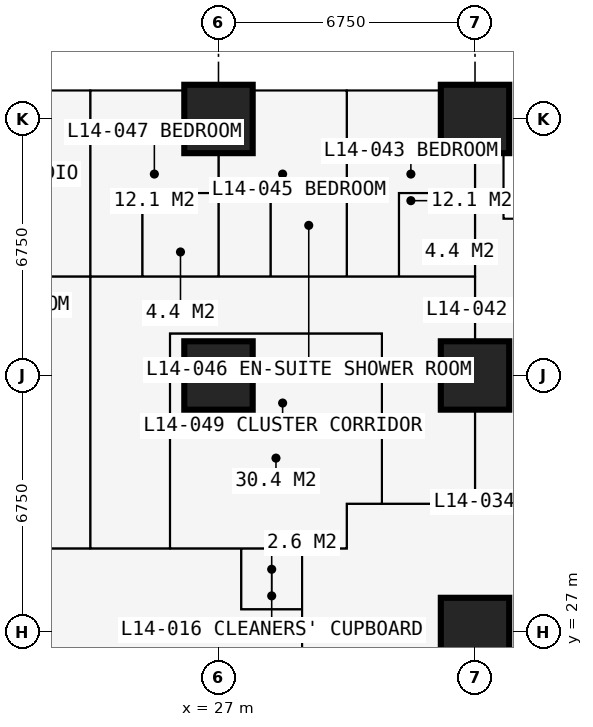
"""IFC4 building model, lengths in metres.
Left out: names, types, materials, properties, quantities, classifications, styles, units other than length and angle.
Written with IfcOpenShell. Run it as: python <this file> out.ifc"""

import sys

from ifc_helpers import new_model, si_unit, direction, frame, frame_2d, origin, origin_2d, place, context, subcontext, project, spatial, rectangle, extrude, element, fill, save


model = new_model("IFC4")
c1 = context("Model", 3, precision=1e-05, world=origin(), true_north=direction((0.0, 1.0)))
c2 = subcontext(c1, "Body", "Model", "MODEL_VIEW")
j1 = project(units=[si_unit("LENGTHUNIT", "METRE"), si_unit("PLANEANGLEUNIT", "RADIAN")], contexts=[c1])
p1 = place(None, origin())
s1 = spatial("IfcSite", under=j1, at=p1, CompositionType="ELEMENT")
p2 = place(p1, origin())
s2 = spatial("IfcBuilding", under=s1, at=p2, CompositionType="ELEMENT")
p3 = place(p2, frame((0.0, 0.0, 54.0)))
s3 = spatial("IfcBuildingStorey", under=s2, at=p3, CompositionType="ELEMENT", Elevation=54.0)
for number, where, z_axis, x_axis in (
    (1, (27.0, 33.75, 0.0), (0.0, 0.0, 1.0), (1.0, 0.0, 0.0)),
    (2, (27.0, 40.5, 0.0), (0.0, 0.0, 1.0), (1.0, 0.0, 0.0)),
    (3, (33.75, 27.0, 0.0), (0.0, 0.0, 1.0), (1.0, 0.0, 0.0)),
    (4, (33.75, 33.75, 0.0), (0.0, 0.0, 1.0), (1.0, 0.0, 0.0)),
    (5, (33.75, 40.5, 0.0), (0.0, 0.0, 1.0), (1.0, 0.0, 0.0)),
):
    element("IfcColumn", number, at=place(p3, frame(where, z_axis=z_axis, x_axis=x_axis)), inside=s3, PredefinedType="COLUMN", context=c2, shape_type="SweptSolid", body=[
        extrude(rectangle(XDim=1.8, YDim=1.8, at=origin_2d()), origin(), (0.0, 0.0, 1.0), 3.6),
    ])
p4 = place(p3, frame((27.6, 27.0, 0.0), z_axis=(0.0, 0.0, 1.0), x_axis=(-1.0, 0.0, 0.0)))
e6 = element("IfcWall", 6, at=p4, inside=s3, PredefinedType="SHEAR", context=c2, shape_type="SweptSolid", body=[
    extrude(rectangle(XDim=14.7, YDim=1.2, at=frame_2d((7.35, 0.0))), origin(), (0.0, 0.0, 1.0), 3.6),
])
p5 = place(p4, frame((4.55, 0.0, 0.0)))
e7 = element("IfcOpeningElement", 7, at=p5, cuts=e6, PredefinedType="OPENING", context=c2, shape_type="SweptSolid", body=[
    extrude(rectangle(XDim=0.9, YDim=2.2, at=frame_2d((0.45, 1.1))), frame((0.0, 0.61, 0.0), z_axis=(0.0, -1.0, 0.0), x_axis=(1.0, 0.0, 0.0)), (0.0, 0.0, 1.0), 1.22),
])
p6 = place(p4, frame((7.525, 0.0, 0.0)))
e8 = element("IfcOpeningElement", 8, at=p6, cuts=e6, PredefinedType="OPENING", context=c2, shape_type="SweptSolid", body=[
    extrude(rectangle(XDim=1.0, YDim=2.2, at=frame_2d((0.5, 1.1))), frame((0.0, 0.61, 0.0), z_axis=(0.0, -1.0, 0.0), x_axis=(1.0, 0.0, 0.0)), (0.0, 0.0, 1.0), 1.22),
])
p7 = place(p3, frame((37.875, 37.875, 0.0), z_axis=(0.0, 0.0, 1.0), x_axis=(-1.0, 0.0, 0.0)))
e9 = element("IfcWall", 9, at=p7, inside=s3, PredefinedType="SOLIDWALL", context=c2, shape_type="SweptSolid", body=[
    extrude(rectangle(XDim=3.375, YDim=0.3, at=frame_2d((1.688, 0.0))), origin(), (0.0, 0.0, 1.0), 3.375),
])
p8 = place(p7, frame((0.788, 0.0, 0.6)))
e10 = element("IfcOpeningElement", 10, at=p8, cuts=e9, PredefinedType="OPENING", context=c2, shape_type="SweptSolid", body=[
    extrude(rectangle(XDim=1.8, YDim=2.1, at=frame_2d((0.9, 1.05))), frame((0.0, 0.16, 0.0), z_axis=(0.0, -1.0, 0.0), x_axis=(1.0, 0.0, 0.0)), (0.0, 0.0, 1.0), 0.32),
])
p9 = place(p3, frame((34.5, 37.875, 0.0), z_axis=(0.0, 0.0, 1.0), x_axis=(0.0, 1.0, 0.0)))
e11 = element("IfcWall", 11, at=p9, inside=s3, PredefinedType="SOLIDWALL", context=c2, shape_type="SweptSolid", body=[
    extrude(rectangle(XDim=3.375, YDim=0.3, at=frame_2d((1.688, 0.0))), origin(), (0.0, 0.0, 1.0), 3.375),
])
p10 = place(p9, frame((0.343, 0.0, 0.9)))
e12 = element("IfcOpeningElement", 12, at=p10, cuts=e11, PredefinedType="OPENING", context=c2, shape_type="SweptSolid", body=[
    extrude(rectangle(XDim=1.2, YDim=1.8, at=frame_2d((0.6, 0.9))), frame((0.0, 0.16, 0.0), z_axis=(0.0, -1.0, 0.0), x_axis=(1.0, 0.0, 0.0)), (0.0, 0.0, 1.0), 0.32),
])
p11 = place(p3, frame((10.125, 36.35, 0.0), z_axis=(0.0, 0.0, 1.0), x_axis=(1.0, 0.0, 0.0)))
e13 = element("IfcWall", 13, at=p11, inside=s3, PredefinedType="PARTITIONING", context=c2, shape_type="SweptSolid", body=[
    extrude(rectangle(XDim=23.625, YDim=0.15, at=frame_2d((11.812, 0.0))), origin(), (0.0, 0.0, 1.0), 3.375),
])
p12 = place(p11, frame((20.5, 0.0, 0.0)))
e14 = element("IfcOpeningElement", 14, at=p12, cuts=e13, PredefinedType="OPENING", context=c2, shape_type="SweptSolid", body=[
    extrude(rectangle(XDim=0.95, YDim=2.2, at=frame_2d((0.475, 1.1))), frame((0.0, 0.085, 0.0), z_axis=(0.0, -1.0, 0.0), x_axis=(1.0, 0.0, 0.0)), (0.0, 0.0, 1.0), 0.17),
])
p13 = place(p11, frame((17.125, 0.0, 0.0)))
e15 = element("IfcOpeningElement", 15, at=p13, cuts=e13, PredefinedType="OPENING", context=c2, shape_type="SweptSolid", body=[
    extrude(rectangle(XDim=0.95, YDim=2.2, at=frame_2d((0.475, 1.1))), frame((0.0, 0.085, 0.0), z_axis=(0.0, -1.0, 0.0), x_axis=(1.0, 0.0, 0.0)), (0.0, 0.0, 1.0), 0.17),
])
p14 = place(p11, frame((13.7, 0.0, 0.0)))
e16 = element("IfcOpeningElement", 16, at=p14, cuts=e13, PredefinedType="OPENING", context=c2, shape_type="SweptSolid", body=[
    extrude(rectangle(XDim=0.95, YDim=2.2, at=frame_2d((0.475, 1.1))), frame((0.0, 0.085, 0.0), z_axis=(0.0, -1.0, 0.0), x_axis=(1.0, 0.0, 0.0)), (0.0, 0.0, 1.0), 0.17),
])
p15 = place(p11, frame((4.2, 0.0, 0.0)))
e17 = element("IfcOpeningElement", 17, at=p15, cuts=e13, PredefinedType="OPENING", context=c2, shape_type="SweptSolid", body=[
    extrude(rectangle(XDim=0.95, YDim=2.2, at=frame_2d((0.475, 1.1))), frame((0.0, 0.085, 0.0), z_axis=(0.0, -1.0, 0.0), x_axis=(1.0, 0.0, 0.0)), (0.0, 0.0, 1.0), 0.17),
])
p16 = place(p11, frame((10.95, 0.0, 0.0)))
e18 = element("IfcOpeningElement", 18, at=p16, cuts=e13, PredefinedType="OPENING", context=c2, shape_type="SweptSolid", body=[
    extrude(rectangle(XDim=0.95, YDim=2.2, at=frame_2d((0.475, 1.1))), frame((0.0, 0.085, 0.0), z_axis=(0.0, -1.0, 0.0), x_axis=(1.0, 0.0, 0.0)), (0.0, 0.0, 1.0), 0.17),
])
p17 = place(p3, frame((11.3, 29.2, 0.0), z_axis=(0.0, 0.0, 1.0), x_axis=(1.0, 0.0, 0.0)))
e19 = element("IfcWall", 19, at=p17, inside=s3, PredefinedType="PARTITIONING", context=c2, shape_type="SweptSolid", body=[
    extrude(rectangle(XDim=19.075, YDim=0.15, at=frame_2d((9.538, 0.0))), origin(), (0.0, 0.0, 1.0), 3.375),
])
p18 = place(p17, frame((12.875, 0.0, 0.0)))
e20 = element("IfcOpeningElement", 20, at=p18, cuts=e19, PredefinedType="OPENING", context=c2, shape_type="SweptSolid", body=[
    extrude(rectangle(XDim=1.0, YDim=2.2, at=frame_2d((0.5, 1.1))), frame((0.0, 0.085, 0.0), z_axis=(0.0, -1.0, 0.0), x_axis=(1.0, 0.0, 0.0)), (0.0, 0.0, 1.0), 0.17),
])
p19 = place(p17, frame((10.438, 0.0, 0.0)))
e21 = element("IfcOpeningElement", 21, at=p19, cuts=e19, PredefinedType="OPENING", context=c2, shape_type="SweptSolid", body=[
    extrude(rectangle(XDim=1.0, YDim=2.2, at=frame_2d((0.5, 1.1))), frame((0.0, 0.085, 0.0), z_axis=(0.0, -1.0, 0.0), x_axis=(1.0, 0.0, 0.0)), (0.0, 0.0, 1.0), 0.17),
])
p20 = place(p17, frame((14.875, 0.0, 0.0)))
e22 = element("IfcOpeningElement", 22, at=p20, cuts=e19, PredefinedType="OPENING", context=c2, shape_type="SweptSolid", body=[
    extrude(rectangle(XDim=0.95, YDim=2.2, at=frame_2d((0.475, 1.1))), frame((0.0, 0.085, 0.0), z_axis=(0.0, -1.0, 0.0), x_axis=(1.0, 0.0, 0.0)), (0.0, 0.0, 1.0), 0.17),
])
p21 = place(p3, frame((23.625, 29.2, 0.0), z_axis=(0.0, 0.0, 1.0), x_axis=(0.0, 1.0, 0.0)))
e23 = element("IfcWall", 23, at=p21, inside=s3, PredefinedType="PARTITIONING", context=c2, shape_type="SweptSolid", body=[
    extrude(rectangle(XDim=12.034, YDim=0.15, at=frame_2d((6.017, 0.0))), origin(), (0.0, 0.0, 1.0), 3.375),
])
p22 = place(p3, frame((25.0, 36.35, 0.0), z_axis=(0.0, 0.0, 1.0), x_axis=(0.0, 1.0, 0.0)))
e24 = element("IfcWall", 24, at=p22, inside=s3, PredefinedType="PARTITIONING", context=c2, shape_type="SweptSolid", body=[
    extrude(rectangle(XDim=2.2, YDim=0.1, at=frame_2d((1.1, 0.0))), origin(), (0.0, 0.0, 1.0), 3.375),
])
p23 = place(p3, frame((25.0, 38.55, 0.0), z_axis=(0.0, 0.0, 1.0), x_axis=(1.0, 0.0, 0.0)))
e25 = element("IfcWall", 25, at=p23, inside=s3, PredefinedType="PARTITIONING", context=c2, shape_type="SweptSolid", body=[
    extrude(rectangle(XDim=2.0, YDim=0.1, at=frame_2d((1.0, 0.0))), origin(), (0.0, 0.0, 1.0), 3.375),
])
p24 = place(p3, frame((25.725, 29.2, 0.0), z_axis=(0.0, 0.0, 1.0), x_axis=(0.0, 1.0, 0.0)))
e26 = element("IfcWall", 26, at=p24, inside=s3, PredefinedType="PARTITIONING", context=c2, shape_type="SweptSolid", body=[
    extrude(rectangle(XDim=5.65, YDim=0.15, at=frame_2d((2.825, 0.0))), origin(), (0.0, 0.0, 1.0), 3.375),
])
p25 = place(p3, frame((25.725, 34.85, 0.0), z_axis=(0.0, 0.0, 1.0), x_axis=(1.0, 0.0, 0.0)))
e27 = element("IfcWall", 27, at=p25, inside=s3, PredefinedType="PARTITIONING", context=c2, shape_type="SweptSolid", body=[
    extrude(rectangle(XDim=5.575, YDim=0.15, at=frame_2d((2.788, 0.0))), origin(), (0.0, 0.0, 1.0), 3.375),
])
p26 = place(p3, frame((27.0, 36.35, 0.0), z_axis=(0.0, 0.0, 1.0), x_axis=(0.0, 1.0, 0.0)))
e28 = element("IfcWall", 28, at=p26, inside=s3, PredefinedType="PARTITIONING", context=c2, shape_type="SweptSolid", body=[
    extrude(rectangle(XDim=4.884, YDim=0.175, at=frame_2d((2.442, 0.0))), origin(), (0.0, 0.0, 1.0), 2.61),
])
p27 = place(p26, frame((0.65, 0.0, 0.0)))
e29 = element("IfcOpeningElement", 29, at=p27, cuts=e28, PredefinedType="OPENING", context=c2, shape_type="SweptSolid", body=[
    extrude(rectangle(XDim=0.9, YDim=2.2, at=frame_2d((0.45, 1.1))), frame((0.0, 0.097, 0.0), z_axis=(0.0, -1.0, 0.0), x_axis=(1.0, 0.0, 0.0)), (0.0, 0.0, 1.0), 0.195),
])
p28 = place(p3, frame((27.6, 27.6, 0.0), z_axis=(0.0, 0.0, 1.0), x_axis=(0.0, 1.0, 0.0)))
e30 = element("IfcWall", 30, at=p28, inside=s3, PredefinedType="PARTITIONING", context=c2, shape_type="SweptSolid", body=[
    extrude(rectangle(XDim=1.6, YDim=0.15, at=frame_2d((0.8, 0.0))), origin(), (0.0, 0.0, 1.0), 3.375),
])
p29 = place(p28, frame((0.3, 0.0, 0.0)))
e31 = element("IfcOpeningElement", 31, at=p29, cuts=e30, PredefinedType="OPENING", context=c2, shape_type="SweptSolid", body=[
    extrude(rectangle(XDim=0.95, YDim=2.2, at=frame_2d((0.475, 1.1))), frame((0.0, 0.085, 0.0), z_axis=(0.0, -1.0, 0.0), x_axis=(1.0, 0.0, 0.0)), (0.0, 0.0, 1.0), 0.17),
])
p30 = place(p3, frame((27.6, 27.6, 0.0), z_axis=(0.0, 0.0, 1.0), x_axis=(1.0, 0.0, 0.0)))
e32 = element("IfcWall", 32, at=p30, inside=s3, PredefinedType="PARTITIONING", context=c2, shape_type="SweptSolid", body=[
    extrude(rectangle(XDim=1.6, YDim=0.15, at=frame_2d((0.8, 0.0))), origin(), (0.0, 0.0, 1.0), 2.877),
])
p31 = place(p3, frame((28.375, 36.35, 0.0), z_axis=(0.0, 0.0, 1.0), x_axis=(0.0, 1.0, 0.0)))
e33 = element("IfcWall", 33, at=p31, inside=s3, PredefinedType="PARTITIONING", context=c2, shape_type="SweptSolid", body=[
    extrude(rectangle(XDim=2.2, YDim=0.1, at=frame_2d((1.1, 0.0))), origin(), (0.0, 0.0, 1.0), 3.375),
])
p32 = place(p3, frame((28.375, 38.55, 0.0), z_axis=(0.0, 0.0, 1.0), x_axis=(1.0, 0.0, 0.0)))
e34 = element("IfcWall", 34, at=p32, inside=s3, PredefinedType="PARTITIONING", context=c2, shape_type="SweptSolid", body=[
    extrude(rectangle(XDim=2.0, YDim=0.1, at=frame_2d((1.0, 0.0))), origin(), (0.0, 0.0, 1.0), 3.375),
])
p33 = place(p3, frame((29.2, 11.3, 0.0), z_axis=(0.0, 0.0, 1.0), x_axis=(0.0, 1.0, 0.0)))
e35 = element("IfcWall", 35, at=p33, inside=s3, PredefinedType="PARTITIONING", context=c2, shape_type="SweptSolid", body=[
    extrude(rectangle(XDim=17.9, YDim=0.2, at=frame_2d((8.95, 0.0))), origin(), (0.0, 0.0, 1.0), 3.375),
])
p34 = place(p33, frame((8.35, 0.0, 0.0)))
e36 = element("IfcOpeningElement", 36, at=p34, cuts=e35, PredefinedType="OPENING", context=c2, shape_type="SweptSolid", body=[
    extrude(rectangle(XDim=1.2, YDim=2.2, at=frame_2d((0.6, 1.1))), frame((0.0, 0.11, 0.0), z_axis=(0.0, -1.0, 0.0), x_axis=(1.0, 0.0, 0.0)), (0.0, 0.0, 1.0), 0.22),
])
p35 = place(p3, frame((30.375, 29.2, 0.0), z_axis=(0.0, 0.0, 1.0), x_axis=(0.0, 1.0, 0.0)))
e37 = element("IfcWall", 37, at=p35, inside=s3, PredefinedType="PARTITIONING", context=c2, shape_type="SweptSolid", body=[
    extrude(rectangle(XDim=1.175, YDim=0.15, at=frame_2d((0.587, 0.0))), origin(), (0.0, 0.0, 1.0), 3.375),
])
p36 = place(p3, frame((30.375, 30.375, 0.0), z_axis=(0.0, 0.0, 1.0), x_axis=(1.0, 0.0, 0.0)))
e38 = element("IfcWall", 38, at=p36, inside=s3, PredefinedType="PARTITIONING", context=c2, shape_type="SweptSolid", body=[
    extrude(rectangle(XDim=10.859, YDim=0.15, at=frame_2d((5.429, 0.0))), origin(), (0.0, 0.0, 1.0), 3.375),
])
p37 = place(p3, frame((30.375, 36.35, 0.0), z_axis=(0.0, 0.0, 1.0), x_axis=(0.0, 1.0, 0.0)))
e39 = element("IfcWall", 39, at=p37, inside=s3, PredefinedType="PARTITIONING", context=c2, shape_type="SweptSolid", body=[
    extrude(rectangle(XDim=4.884, YDim=0.175, at=frame_2d((2.442, 0.0))), origin(), (0.0, 0.0, 1.0), 3.375),
])
p38 = place(p37, frame((0.65, 0.0, 0.0)))
e40 = element("IfcOpeningElement", 40, at=p38, cuts=e39, PredefinedType="OPENING", context=c2, shape_type="SweptSolid", body=[
    extrude(rectangle(XDim=0.9, YDim=2.2, at=frame_2d((0.45, 1.1))), frame((0.0, 0.097, 0.0), z_axis=(0.0, -1.0, 0.0), x_axis=(1.0, 0.0, 0.0)), (0.0, 0.0, 1.0), 0.195),
])
p39 = place(p3, frame((31.3, 30.375, 0.0), z_axis=(0.0, 0.0, 1.0), x_axis=(0.0, 1.0, 0.0)))
e41 = element("IfcWall", 41, at=p39, inside=s3, PredefinedType="PARTITIONING", context=c2, shape_type="SweptSolid", body=[
    extrude(rectangle(XDim=4.475, YDim=0.15, at=frame_2d((2.238, 0.0))), origin(), (0.0, 0.0, 1.0), 3.375),
])
p40 = place(p3, frame((31.75, 36.35, 0.0), z_axis=(0.0, 0.0, 1.0), x_axis=(0.0, 1.0, 0.0)))
e42 = element("IfcWall", 42, at=p40, inside=s3, PredefinedType="PARTITIONING", context=c2, shape_type="SweptSolid", body=[
    extrude(rectangle(XDim=2.2, YDim=0.1, at=frame_2d((1.1, 0.0))), origin(), (0.0, 0.0, 1.0), 3.375),
])
p41 = place(p40, frame((0.65, 0.0, 0.0)))
e43 = element("IfcOpeningElement", 43, at=p41, cuts=e42, PredefinedType="OPENING", context=c2, shape_type="SweptSolid", body=[
    extrude(rectangle(XDim=0.9, YDim=2.2, at=frame_2d((0.45, 1.1))), frame((0.0, 0.06, 0.0), z_axis=(0.0, -1.0, 0.0), x_axis=(1.0, 0.0, 0.0)), (0.0, 0.0, 1.0), 0.12),
])
p42 = place(p3, frame((31.75, 38.55, 0.0), z_axis=(0.0, 0.0, 1.0), x_axis=(1.0, 0.0, 0.0)))
e44 = element("IfcWall", 44, at=p42, inside=s3, PredefinedType="PARTITIONING", context=c2, shape_type="SweptSolid", body=[
    extrude(rectangle(XDim=2.0, YDim=0.1, at=frame_2d((1.0, 0.0))), origin(), (0.0, 0.0, 1.0), 3.375),
])
p43 = place(p3, frame((33.75, 30.375, 0.0), z_axis=(0.0, 0.0, 1.0), x_axis=(0.0, 1.0, 0.0)))
e45 = element("IfcWall", 45, at=p43, inside=s3, PredefinedType="PARTITIONING", context=c2, shape_type="SweptSolid", body=[
    extrude(rectangle(XDim=10.859, YDim=0.15, at=frame_2d((5.429, 0.0))), origin(), (0.0, 0.0, 1.0), 2.877),
])
p44 = place(p43, frame((1.45, 0.0, 0.0)))
e46 = element("IfcOpeningElement", 46, at=p44, cuts=e45, PredefinedType="OPENING", context=c2, shape_type="SweptSolid", body=[
    extrude(rectangle(XDim=1.0, YDim=2.2, at=frame_2d((0.5, 1.1))), frame((0.0, 0.085, 0.0), z_axis=(0.0, -1.0, 0.0), x_axis=(1.0, 0.0, 0.0)), (0.0, 0.0, 1.0), 0.17),
])
p45 = place(p10, origin())
e47 = element("IfcWindow", 47, at=p45, inside=s3, PartitioningType="SINGLE_PANEL", PredefinedType="WINDOW", context=c2, shape_type="SweptSolid", body=[
    extrude(rectangle(XDim=1.2, YDim=1.8, at=frame_2d((0.6, 0.9))), frame((0.0, 0.03, 0.0), z_axis=(0.0, -1.0, 0.0), x_axis=(1.0, 0.0, 0.0)), (0.0, 0.0, 1.0), 0.06),
])
fill(e12, e47)
p46 = place(p5, origin())
e48 = element("IfcDoor", 48, at=p46, inside=s3, OperationType="SINGLE_SWING_LEFT", PredefinedType="DOOR", context=c2, shape_type="SweptSolid", body=[
    extrude(rectangle(XDim=0.9, YDim=2.2, at=frame_2d((0.45, 1.1))), frame((0.0, 0.4, 0.0), z_axis=(0.0, -1.0, 0.0), x_axis=(1.0, 0.0, 0.0)), (0.0, 0.0, 1.0), 0.8),
])
fill(e7, e48)
p47 = place(p29, origin())
e49 = element("IfcDoor", 49, at=p47, inside=s3, OperationType="SINGLE_SWING_LEFT", PredefinedType="DOOR", context=c2, shape_type="SweptSolid", body=[
    extrude(rectangle(XDim=0.95, YDim=2.2, at=frame_2d((0.475, 1.1))), frame((0.0, 0.025, 0.0), z_axis=(0.0, -1.0, 0.0), x_axis=(1.0, 0.0, 0.0)), (0.0, 0.0, 1.0), 0.05),
])
fill(e31, e49)
p48 = place(p44, origin())
e50 = element("IfcDoor", 50, at=p48, inside=s3, OperationType="SINGLE_SWING_LEFT", PredefinedType="DOOR", context=c2, shape_type="SweptSolid", body=[
    extrude(rectangle(XDim=1.0, YDim=2.2, at=frame_2d((0.5, 1.1))), frame((0.0, 0.025, 0.0), z_axis=(0.0, -1.0, 0.0), x_axis=(1.0, 0.0, 0.0)), (0.0, 0.0, 1.0), 0.05),
])
fill(e46, e50)
p49 = place(p12, origin())
e51 = element("IfcDoor", 51, at=p49, inside=s3, OperationType="SINGLE_SWING_LEFT", PredefinedType="DOOR", context=c2, shape_type="SweptSolid", body=[
    extrude(rectangle(XDim=0.95, YDim=2.2, at=frame_2d((0.475, 1.1))), frame((0.0, 0.025, 0.0), z_axis=(0.0, -1.0, 0.0), x_axis=(1.0, 0.0, 0.0)), (0.0, 0.0, 1.0), 0.05),
])
fill(e14, e51)
p50 = place(p41, origin())
e52 = element("IfcDoor", 52, at=p50, inside=s3, OperationType="SINGLE_SWING_RIGHT", PredefinedType="DOOR", context=c2, shape_type="SweptSolid", body=[
    extrude(rectangle(XDim=0.9, YDim=2.2, at=frame_2d((0.45, 1.1))), frame((0.0, 0.025, 0.0), z_axis=(0.0, -1.0, 0.0), x_axis=(1.0, 0.0, 0.0)), (0.0, 0.0, 1.0), 0.05),
])
fill(e43, e52)
p51 = place(p13, origin())
e53 = element("IfcDoor", 53, at=p51, inside=s3, OperationType="SINGLE_SWING_LEFT", PredefinedType="DOOR", context=c2, shape_type="SweptSolid", body=[
    extrude(rectangle(XDim=0.95, YDim=2.2, at=frame_2d((0.475, 1.1))), frame((0.0, 0.025, 0.0), z_axis=(0.0, -1.0, 0.0), x_axis=(1.0, 0.0, 0.0)), (0.0, 0.0, 1.0), 0.05),
])
fill(e15, e53)
p52 = place(p38, origin())
e54 = element("IfcDoor", 54, at=p52, inside=s3, OperationType="SINGLE_SWING_RIGHT", PredefinedType="DOOR", context=c2, shape_type="SweptSolid", body=[
    extrude(rectangle(XDim=0.9, YDim=2.2, at=frame_2d((0.45, 1.1))), frame((0.0, 0.025, 0.0), z_axis=(0.0, -1.0, 0.0), x_axis=(1.0, 0.0, 0.0)), (0.0, 0.0, 1.0), 0.05),
])
fill(e40, e54)
p53 = place(p14, origin())
e55 = element("IfcDoor", 55, at=p53, inside=s3, OperationType="SINGLE_SWING_LEFT", PredefinedType="DOOR", context=c2, shape_type="SweptSolid", body=[
    extrude(rectangle(XDim=0.95, YDim=2.2, at=frame_2d((0.475, 1.1))), frame((0.0, 0.025, 0.0), z_axis=(0.0, -1.0, 0.0), x_axis=(1.0, 0.0, 0.0)), (0.0, 0.0, 1.0), 0.05),
])
fill(e16, e55)
p54 = place(p27, origin())
e56 = element("IfcDoor", 56, at=p54, inside=s3, OperationType="SINGLE_SWING_RIGHT", PredefinedType="DOOR", context=c2, shape_type="SweptSolid", body=[
    extrude(rectangle(XDim=0.9, YDim=2.2, at=frame_2d((0.45, 1.1))), frame((0.0, 0.025, 0.0), z_axis=(0.0, -1.0, 0.0), x_axis=(1.0, 0.0, 0.0)), (0.0, 0.0, 1.0), 0.05),
])
fill(e29, e56)
p55 = place(p18, origin())
e57 = element("IfcDoor", 57, at=p55, inside=s3, OperationType="SINGLE_SWING_LEFT", PredefinedType="DOOR", context=c2, shape_type="SweptSolid", body=[
    extrude(rectangle(XDim=1.0, YDim=2.2, at=frame_2d((0.5, 1.1))), frame((0.0, 0.025, 0.0), z_axis=(0.0, -1.0, 0.0), x_axis=(1.0, 0.0, 0.0)), (0.0, 0.0, 1.0), 0.05),
])
fill(e20, e57)
p56 = place(p19, origin())
e58 = element("IfcDoor", 58, at=p56, inside=s3, OperationType="SINGLE_SWING_LEFT", PredefinedType="DOOR", context=c2, shape_type="SweptSolid", body=[
    extrude(rectangle(XDim=1.0, YDim=2.2, at=frame_2d((0.5, 1.1))), frame((0.0, 0.025, 0.0), z_axis=(0.0, -1.0, 0.0), x_axis=(1.0, 0.0, 0.0)), (0.0, 0.0, 1.0), 0.05),
])
fill(e21, e58)
p57 = place(p20, origin())
e59 = element("IfcDoor", 59, at=p57, inside=s3, OperationType="SINGLE_SWING_LEFT", PredefinedType="DOOR", context=c2, shape_type="SweptSolid", body=[
    extrude(rectangle(XDim=0.95, YDim=2.2, at=frame_2d((0.475, 1.1))), frame((0.0, 0.025, 0.0), z_axis=(0.0, -1.0, 0.0), x_axis=(1.0, 0.0, 0.0)), (0.0, 0.0, 1.0), 0.05),
])
fill(e22, e59)
save(model, sys.argv[1])
